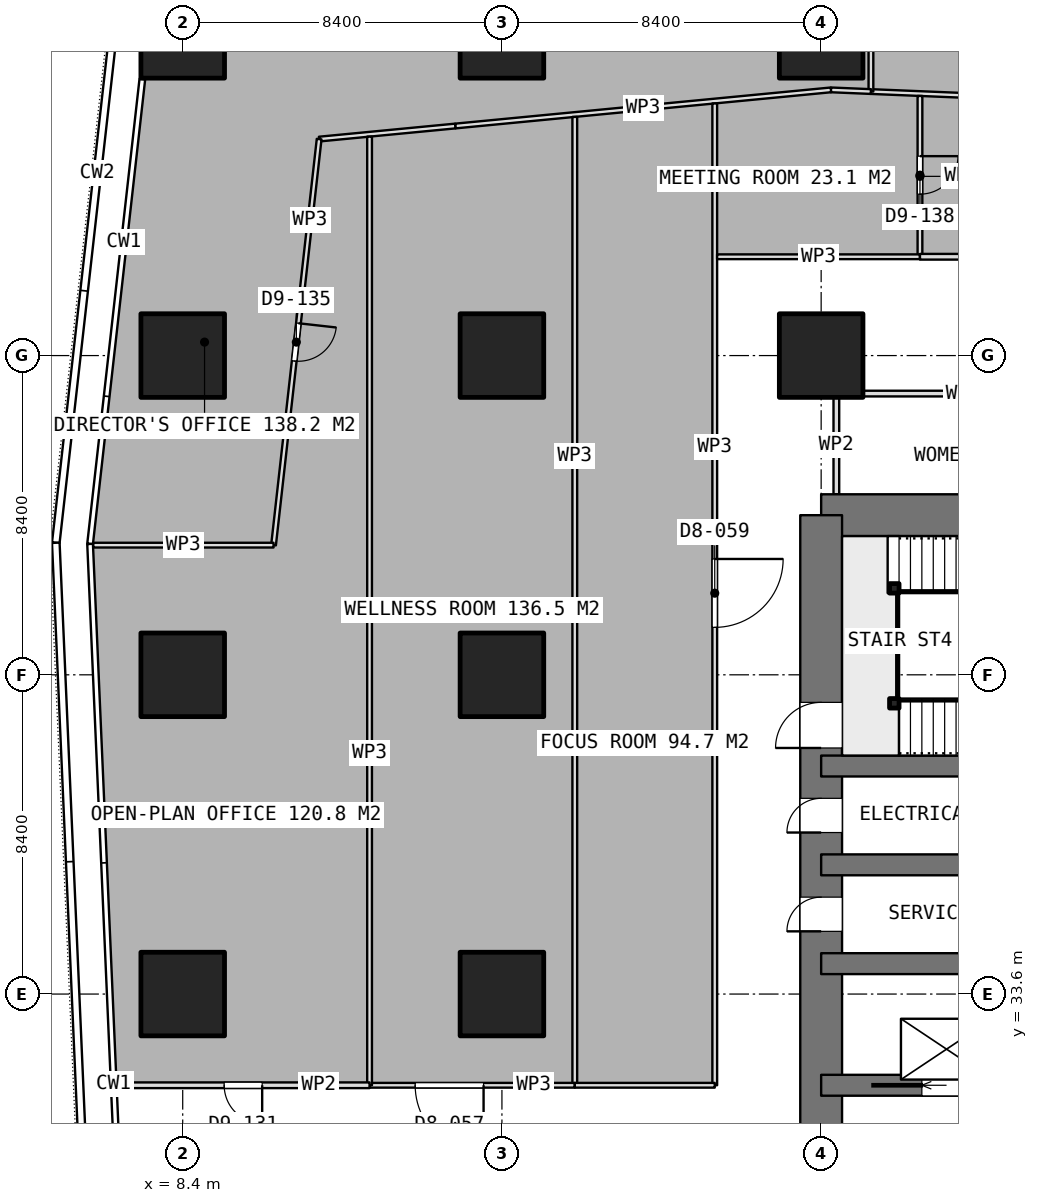
"""IFC4 building model, lengths in metres.
Left out: names, types, materials, properties, quantities, classifications, styles, units other than length and angle.
Written with IfcOpenShell. Run it as: python <this file> out.ifc"""

import sys

from ifc_helpers import new_model, si_unit, direction, frame, frame_2d, origin, origin_2d, place, context, subcontext, project, spatial, rectangle, extrude, element, fill, save


model = new_model("IFC4")
c1 = context("Model", 3, precision=1e-05, world=origin(), true_north=direction((0.0, 1.0)))
c2 = subcontext(c1, "Body", "Model", "MODEL_VIEW")
j1 = project(units=[si_unit("LENGTHUNIT", "METRE"), si_unit("PLANEANGLEUNIT", "RADIAN")], contexts=[c1])
p1 = place(None, origin())
s1 = spatial("IfcSite", under=j1, at=p1, CompositionType="ELEMENT")
p2 = place(p1, origin())
s2 = spatial("IfcBuilding", under=s1, at=p2, CompositionType="ELEMENT")
p3 = place(p2, frame((0.0, 0.0, 47.9)))
s3 = spatial("IfcBuildingStorey", under=s2, at=p3, CompositionType="ELEMENT", Elevation=47.9)
p4 = place(p3, frame((25.2, 46.2, 0.0), z_axis=(0.0, 0.0, 1.0), x_axis=(1.0, 0.0, 0.0)))
e1 = element("IfcWall", 1, at=p4, inside=s3, PredefinedType="SHEAR", context=c2, shape_type="SweptSolid", body=[
    extrude(rectangle(XDim=10.4, YDim=1.1, at=frame_2d((5.2, 0.0))), origin(), (0.0, 0.0, 1.0), 3.75),
])
p5 = place(p3, frame((25.2, 21.0, 0.0), z_axis=(0.0, 0.0, 1.0), x_axis=(0.0, 1.0, 0.0)))
e2 = element("IfcWall", 2, at=p5, inside=s3, PredefinedType="SHEAR", context=c2, shape_type="SweptSolid", body=[
    extrude(rectangle(XDim=25.2, YDim=1.1, at=frame_2d((12.6, 0.0))), origin(), (0.0, 0.0, 1.0), 3.75),
])
p6 = place(p5, frame((7.8, 0.0, 0.0)))
e3 = element("IfcOpeningElement", 3, at=p6, cuts=e2, PredefinedType="OPENING", context=c2, shape_type="SweptSolid", body=[
    extrude(rectangle(XDim=1.2, YDim=2.1, at=frame_2d((0.6, 1.05))), frame((0.0, 0.56, 0.0), z_axis=(0.0, -1.0, 0.0), x_axis=(1.0, 0.0, 0.0)), (0.0, 0.0, 1.0), 1.12),
])
p7 = place(p5, frame((14.25, 0.0, 0.0)))
e4 = element("IfcOpeningElement", 4, at=p7, cuts=e2, PredefinedType="OPENING", context=c2, shape_type="SweptSolid", body=[
    extrude(rectangle(XDim=0.9, YDim=2.1, at=frame_2d((0.45, 1.05))), frame((0.0, 0.56, 0.0), z_axis=(0.0, -1.0, 0.0), x_axis=(1.0, 0.0, 0.0)), (0.0, 0.0, 1.0), 1.12),
])
p8 = place(p5, frame((16.85, 0.0, 0.0)))
e5 = element("IfcOpeningElement", 5, at=p8, cuts=e2, PredefinedType="OPENING", context=c2, shape_type="SweptSolid", body=[
    extrude(rectangle(XDim=0.9, YDim=2.1, at=frame_2d((0.45, 1.05))), frame((0.0, 0.56, 0.0), z_axis=(0.0, -1.0, 0.0), x_axis=(1.0, 0.0, 0.0)), (0.0, 0.0, 1.0), 1.12),
])
p9 = place(p5, frame((19.075, 0.0, 0.0)))
e6 = element("IfcOpeningElement", 6, at=p9, cuts=e2, PredefinedType="OPENING", context=c2, shape_type="SweptSolid", body=[
    extrude(rectangle(XDim=1.2, YDim=2.1, at=frame_2d((0.6, 1.05))), frame((0.0, 0.56, 0.0), z_axis=(0.0, -1.0, 0.0), x_axis=(1.0, 0.0, 0.0)), (0.0, 0.0, 1.0), 1.12),
])
p10 = place(p3, frame((25.2, 31.2, 0.0), z_axis=(0.0, 0.0, 1.0), x_axis=(1.0, 0.0, 0.0)))
e7 = element("IfcWall", 7, at=p10, inside=s3, PredefinedType="SHEAR", context=c2, shape_type="SweptSolid", body=[
    extrude(rectangle(XDim=6.6, YDim=0.55, at=frame_2d((3.3, 0.0))), origin(), (0.0, 0.0, 1.0), 3.75),
])
p11 = place(p10, frame((2.65, 0.0, 0.0)))
e8 = element("IfcOpeningElement", 8, at=p11, cuts=e7, PredefinedType="OPENING", context=c2, shape_type="SweptSolid", body=[
    extrude(rectangle(XDim=1.3, YDim=2.1, at=frame_2d((0.65, 1.05))), frame((0.0, 0.285, 0.0), z_axis=(0.0, -1.0, 0.0), x_axis=(1.0, 0.0, 0.0)), (0.0, 0.0, 1.0), 0.57),
])
for number, where, z_axis, x_axis in (
    (9, (25.2, 34.4, 0.0), (0.0, 0.0, 1.0), (1.0, 0.0, 0.0)),
    (10, (25.2, 37.0, 0.0), (0.0, 0.0, 1.0), (1.0, 0.0, 0.0)),
    (11, (25.2, 39.6, 0.0), (0.0, 0.0, 1.0), (1.0, 0.0, 0.0)),
):
    element("IfcWall", number, at=place(p3, frame(where, z_axis=z_axis, x_axis=x_axis)), inside=s3, PredefinedType="SHEAR", context=c2, shape_type="SweptSolid", body=[
        extrude(rectangle(XDim=6.6, YDim=0.55, at=frame_2d((3.3, 0.0))), origin(), (0.0, 0.0, 1.0), 3.75),
    ])
for number, where, z_axis, x_axis in (
    (12, (8.4, 33.6, 0.0), (0.0, 0.0, 1.0), (1.0, 0.0, 0.0)),
    (13, (8.4, 42.0, 0.0), (0.0, 0.0, 1.0), (1.0, 0.0, 0.0)),
    (14, (8.4, 50.4, 0.0), (0.0, 0.0, 1.0), (1.0, 0.0, 0.0)),
    (15, (8.4, 58.8, 0.0), (0.0, 0.0, 1.0), (1.0, 0.0, 0.0)),
    (16, (16.8, 33.6, 0.0), (0.0, 0.0, 1.0), (1.0, 0.0, 0.0)),
    (17, (16.8, 42.0, 0.0), (0.0, 0.0, 1.0), (1.0, 0.0, 0.0)),
    (18, (16.8, 50.4, 0.0), (0.0, 0.0, 1.0), (1.0, 0.0, 0.0)),
    (19, (16.8, 58.8, 0.0), (0.0, 0.0, 1.0), (1.0, 0.0, 0.0)),
    (20, (25.2, 50.4, 0.0), (0.0, 0.0, 1.0), (1.0, 0.0, 0.0)),
    (21, (25.2, 58.8, 0.0), (0.0, 0.0, 1.0), (1.0, 0.0, 0.0)),
):
    element("IfcColumn", number, at=place(p3, frame(where, z_axis=z_axis, x_axis=x_axis)), inside=s3, PredefinedType="COLUMN", context=c2, shape_type="SweptSolid", body=[
        extrude(rectangle(XDim=2.2, YDim=2.2, at=origin_2d()), origin(), (0.0, 0.0, 1.0), 3.75),
    ])
p12 = place(p3, frame((25.525, 49.4, 0.0), z_axis=(0.0, 0.0, 1.0), x_axis=(1.0, 0.0, 0.0)))
e22 = element("IfcWall", 22, at=p12, inside=s3, PredefinedType="PARTITIONING", context=c2, shape_type="SweptSolid", body=[
    extrude(rectangle(XDim=9.75, YDim=0.15, at=frame_2d((4.875, 0.0))), origin(), (0.0, 0.0, 1.0), 3.5),
])
p13 = place(p12, frame((4.375, 0.0, 0.0)))
e23 = element("IfcOpeningElement", 23, at=p13, cuts=e22, PredefinedType="OPENING", context=c2, shape_type="SweptSolid", body=[
    extrude(rectangle(XDim=1.0, YDim=2.1, at=frame_2d((0.5, 1.05))), frame((0.0, 0.085, 0.0), z_axis=(0.0, -1.0, 0.0), x_axis=(1.0, 0.0, 0.0)), (0.0, 0.0, 1.0), 0.17),
])
p14 = place(p3, frame((25.6, 46.75, 0.0), z_axis=(0.0, 0.0, 1.0), x_axis=(0.0, 1.0, 0.0)))
e24 = element("IfcWall", 24, at=p14, inside=s3, PredefinedType="PARTITIONING", context=c2, shape_type="SweptSolid", body=[
    extrude(rectangle(XDim=2.575, YDim=0.15, at=frame_2d((1.288, 0.0))), origin(), (0.0, 0.0, 1.0), 3.5),
])
p15 = place(p3, frame((34.021, 57.037, 0.0), z_axis=(0.0, 0.0, 1.0), x_axis=(-0.999150378183, 0.041213126277, 0.0)))
e25 = element("IfcWall", 25, at=p15, inside=s3, PredefinedType="PARTITIONING", context=c2, shape_type="SweptSolid", body=[
    extrude(rectangle(XDim=7.517, YDim=0.125, at=frame_2d((3.759, 0.0))), origin(), (0.0, 0.0, 1.0), 3.5),
])
p16 = place(p15, frame((3.259, 0.0, 0.0)))
e26 = element("IfcOpeningElement", 26, at=p16, cuts=e25, PredefinedType="OPENING", context=c2, shape_type="SweptSolid", body=[
    extrude(rectangle(XDim=1.0, YDim=2.1, at=frame_2d((0.5, 1.05))), frame((0.0, 0.073, 0.0), z_axis=(0.0, -1.0, 0.0), x_axis=(1.0, 0.0, 0.0)), (0.0, 0.0, 1.0), 0.145),
])
p17 = place(p3, frame((26.51, 57.347, 0.0), z_axis=(0.0, 0.0, 1.0), x_axis=(0.0, 1.0, 0.0)))
e27 = element("IfcWall", 27, at=p17, inside=s3, PredefinedType="PARTITIONING", context=c2, shape_type="SweptSolid", body=[
    extrude(rectangle(XDim=4.724, YDim=0.125, at=frame_2d((2.362, 0.0))), origin(), (0.0, 0.0, 1.0), 3.5),
])
p18 = place(p3, frame((26.509, 57.347, 0.0), z_axis=(0.0, 0.0, 1.0), x_axis=(-0.999118951292, 0.041968097049, 0.0)))
e28 = element("IfcWall", 28, at=p18, inside=s3, PredefinedType="PARTITIONING", context=c2, shape_type="SweptSolid", body=[
    extrude(rectangle(XDim=1.053, YDim=0.125, at=frame_2d((0.526, 0.0))), origin(), (0.0, 0.0, 1.0), 3.5),
])
p19 = place(p3, frame((25.457, 57.391, 0.0), z_axis=(0.0, 0.0, 1.0), x_axis=(-0.995401503094, -0.095790644833, 0.0)))
e29 = element("IfcWall", 29, at=p19, inside=s3, PredefinedType="PARTITIONING", context=c2, shape_type="SweptSolid", body=[
    extrude(rectangle(XDim=9.93, YDim=0.125, at=frame_2d((4.965, 0.0))), origin(), (0.0, 0.0, 1.0), 3.5),
])
p20 = place(p3, frame((15.572, 56.44, 0.0), z_axis=(0.0, 0.0, 1.0), x_axis=(-0.995420457926, -0.095593472275, 0.0)))
e30 = element("IfcWall", 30, at=p20, inside=s3, PredefinedType="PARTITIONING", context=c2, shape_type="SweptSolid", body=[
    extrude(rectangle(XDim=3.599, YDim=0.125, at=frame_2d((1.799, 0.0))), origin(), (0.0, 0.0, 1.0), 3.5),
])
p21 = place(p3, frame((11.99, 56.096, 0.0), z_axis=(0.0, 0.0, 1.0), x_axis=(-0.111612849984, -0.993751765643, 0.0)))
e31 = element("IfcWall", 31, at=p21, inside=s3, PredefinedType="PARTITIONING", context=c2, shape_type="SweptSolid", body=[
    extrude(rectangle(XDim=10.751, YDim=0.125, at=frame_2d((5.375, 0.0))), origin(), (0.0, 0.0, 1.0), 3.5),
])
p22 = place(p21, frame((4.876, 0.0, 0.0)))
e32 = element("IfcOpeningElement", 32, at=p22, cuts=e31, PredefinedType="OPENING", context=c2, shape_type="SweptSolid", body=[
    extrude(rectangle(XDim=1.0, YDim=2.1, at=frame_2d((0.5, 1.05))), frame((0.0, 0.073, 0.0), z_axis=(0.0, -1.0, 0.0), x_axis=(1.0, 0.0, 0.0)), (0.0, 0.0, 1.0), 0.145),
])
p23 = place(p3, frame((10.79, 45.412, 0.0), z_axis=(0.0, 0.0, 1.0), x_axis=(-1.0, 0.0, 0.0)))
e33 = element("IfcWall", 33, at=p23, inside=s3, PredefinedType="PARTITIONING", context=c2, shape_type="SweptSolid", body=[
    extrude(rectangle(XDim=4.746, YDim=0.125, at=frame_2d((2.373, 0.0))), origin(), (0.0, 0.0, 1.0), 3.5),
])
p24 = place(p3, frame((18.717, 56.68, 0.0), z_axis=(0.0, 0.0, 1.0), x_axis=(0.0, -1.0, 0.0)))
e34 = element("IfcWall", 34, at=p24, inside=s3, PredefinedType="PARTITIONING", context=c2, shape_type="SweptSolid", body=[
    extrude(rectangle(XDim=25.48, YDim=0.125, at=frame_2d((12.74, 0.0))), origin(), (0.0, 0.0, 1.0), 3.5),
])
p25 = place(p3, frame((18.717, 31.2, 0.0), z_axis=(0.0, 0.0, 1.0), x_axis=(-1.0, 0.0, 0.0)))
e35 = element("IfcWall", 35, at=p25, inside=s3, PredefinedType="PARTITIONING", context=c2, shape_type="SweptSolid", body=[
    extrude(rectangle(XDim=5.4, YDim=0.125, at=frame_2d((2.7, 0.0))), origin(), (0.0, 0.0, 1.0), 3.5),
])
p26 = place(p25, frame((2.4, 0.0, 0.0)))
e36 = element("IfcOpeningElement", 36, at=p26, cuts=e35, PredefinedType="OPENING", context=c2, shape_type="SweptSolid", body=[
    extrude(rectangle(XDim=1.8, YDim=2.1, at=frame_2d((0.9, 1.05))), frame((0.0, 0.073, 0.0), z_axis=(0.0, -1.0, 0.0), x_axis=(1.0, 0.0, 0.0)), (0.0, 0.0, 1.0), 0.145),
])
p27 = place(p3, frame((13.317, 31.2, 0.0), z_axis=(0.0, 0.0, 1.0), x_axis=(0.0, 1.0, 0.0)))
e37 = element("IfcWall", 37, at=p27, inside=s3, PredefinedType="PARTITIONING", context=c2, shape_type="SweptSolid", body=[
    extrude(rectangle(XDim=24.961, YDim=0.125, at=frame_2d((12.48, 0.0))), origin(), (0.0, 0.0, 1.0), 3.5),
])
p28 = place(p3, frame((22.4, 57.034, 0.0), z_axis=(0.0, 0.0, 1.0), x_axis=(0.0, -1.0, 0.0)))
e38 = element("IfcWall", 38, at=p28, inside=s3, PredefinedType="PARTITIONING", context=c2, shape_type="SweptSolid", body=[
    extrude(rectangle(XDim=25.834, YDim=0.125, at=frame_2d((12.917, 0.0))), origin(), (0.0, 0.0, 1.0), 3.5),
])
p29 = place(p28, frame((11.986, 0.0, 0.0)))
e39 = element("IfcOpeningElement", 39, at=p29, cuts=e38, PredefinedType="OPENING", context=c2, shape_type="SweptSolid", body=[
    extrude(rectangle(XDim=1.8, YDim=2.1, at=frame_2d((0.9, 1.05))), frame((0.0, 0.073, 0.0), z_axis=(0.0, -1.0, 0.0), x_axis=(1.0, 0.0, 0.0)), (0.0, 0.0, 1.0), 0.145),
])
p30 = place(p3, frame((22.4, 31.2, 0.0), z_axis=(0.0, 0.0, 1.0), x_axis=(-1.0, 0.0, 0.0)))
e40 = element("IfcWall", 40, at=p30, inside=s3, PredefinedType="PARTITIONING", context=c2, shape_type="SweptSolid", body=[
    extrude(rectangle(XDim=3.683, YDim=0.125, at=frame_2d((1.841, 0.0))), origin(), (0.0, 0.0, 1.0), 3.5),
])
p31 = place(p3, frame((27.8, 57.231, 0.0), z_axis=(0.0, 0.0, 1.0), x_axis=(0.0, -1.0, 0.0)))
e41 = element("IfcWall", 41, at=p31, inside=s3, PredefinedType="PARTITIONING", context=c2, shape_type="SweptSolid", body=[
    extrude(rectangle(XDim=4.231, YDim=0.125, at=frame_2d((2.115, 0.0))), origin(), (0.0, 0.0, 1.0), 3.5),
])
p32 = place(p31, frame((1.584, 0.0, 0.0)))
e42 = element("IfcOpeningElement", 42, at=p32, cuts=e41, PredefinedType="OPENING", context=c2, shape_type="SweptSolid", body=[
    extrude(rectangle(XDim=1.0, YDim=2.1, at=frame_2d((0.5, 1.05))), frame((0.0, 0.073, 0.0), z_axis=(0.0, -1.0, 0.0), x_axis=(1.0, 0.0, 0.0)), (0.0, 0.0, 1.0), 0.145),
])
p33 = place(p3, frame((27.8, 53.0, 0.0), z_axis=(0.0, 0.0, 1.0), x_axis=(-1.0, 0.0, 0.0)))
e43 = element("IfcWall", 43, at=p33, inside=s3, PredefinedType="PARTITIONING", context=c2, shape_type="SweptSolid", body=[
    extrude(rectangle(XDim=5.338, YDim=0.125, at=frame_2d((2.669, 0.0))), origin(), (0.0, 0.0, 1.0), 3.5),
])
p34 = place(p3, frame((36.3, 53.0, 0.0), z_axis=(0.0, 0.0, 1.0), x_axis=(-1.0, 0.0, 0.0)))
e44 = element("IfcWall", 44, at=p34, inside=s3, PredefinedType="PARTITIONING", context=c2, shape_type="SweptSolid", body=[
    extrude(rectangle(XDim=8.5, YDim=0.15, at=frame_2d((4.25, 0.0))), origin(), (0.0, 0.0, 1.0), 3.5),
])
p35 = place(p34, frame((3.75, 0.0, 0.0)))
e45 = element("IfcOpeningElement", 45, at=p35, cuts=e44, PredefinedType="OPENING", context=c2, shape_type="SweptSolid", body=[
    extrude(rectangle(XDim=1.0, YDim=2.1, at=frame_2d((0.5, 1.05))), frame((0.0, 0.085, 0.0), z_axis=(0.0, -1.0, 0.0), x_axis=(1.0, 0.0, 0.0)), (0.0, 0.0, 1.0), 0.17),
])
p36 = place(p3, frame((13.317, 31.2, 0.0), z_axis=(0.0, 0.0, 1.0), x_axis=(-1.0, 0.0, 0.0)))
e46 = element("IfcWall", 46, at=p36, inside=s3, PredefinedType="PARTITIONING", context=c2, shape_type="SweptSolid", body=[
    extrude(rectangle(XDim=6.682, YDim=0.15, at=frame_2d((3.341, 0.0))), origin(), (0.0, 0.0, 1.0), 3.5),
])
p37 = place(p36, frame((2.826, 0.0, 0.0)))
e47 = element("IfcOpeningElement", 47, at=p37, cuts=e46, PredefinedType="OPENING", context=c2, shape_type="SweptSolid", body=[
    extrude(rectangle(XDim=1.0, YDim=2.1, at=frame_2d((0.5, 1.05))), frame((0.0, 0.085, 0.0), z_axis=(0.0, -1.0, 0.0), x_axis=(1.0, 0.0, 0.0)), (0.0, 0.0, 1.0), 0.17),
])
for number, where, z_axis, x_axis in (
    (48, (27.125, 41.25, 0.0), (0.0, 0.0, 1.0), (1.0, 0.0, 0.0)),
    (49, (27.125, 44.275, 0.0), (0.0, 0.0, 1.0), (1.0, 0.0, 0.0)),
):
    element("IfcColumn", number, at=place(p3, frame(where, z_axis=z_axis, x_axis=x_axis)), inside=s3, PredefinedType="COLUMN", context=c2, shape_type="SweptSolid", body=[
        extrude(rectangle(XDim=0.25, YDim=0.25, at=origin_2d()), origin(), (0.0, 0.0, 1.0), 3.75),
    ])
p38 = place(p7, origin())
e50 = element("IfcDoor", 50, at=p38, inside=s3, OperationType="SINGLE_SWING_LEFT", PredefinedType="DOOR", context=c2, shape_type="SweptSolid", body=[
    extrude(rectangle(XDim=0.9, YDim=2.1, at=frame_2d((0.45, 1.05))), frame((0.0, 0.025, 0.0), z_axis=(0.0, -1.0, 0.0), x_axis=(1.0, 0.0, 0.0)), (0.0, 0.0, 1.0), 0.05),
])
fill(e4, e50)
p39 = place(p8, origin())
e51 = element("IfcDoor", 51, at=p39, inside=s3, OperationType="SINGLE_SWING_LEFT", PredefinedType="DOOR", context=c2, shape_type="SweptSolid", body=[
    extrude(rectangle(XDim=0.9, YDim=2.1, at=frame_2d((0.45, 1.05))), frame((0.0, 0.025, 0.0), z_axis=(0.0, -1.0, 0.0), x_axis=(1.0, 0.0, 0.0)), (0.0, 0.0, 1.0), 0.05),
])
fill(e5, e51)
p40 = place(p11, origin())
e52 = element("IfcDoor", 52, at=p40, inside=s3, OperationType="SLIDING_TO_LEFT", PredefinedType="USERDEFINED", context=c2, shape_type="SweptSolid", body=[
    extrude(rectangle(XDim=1.3, YDim=2.1, at=frame_2d((0.65, 1.05))), frame((0.0, 0.025, 0.0), z_axis=(0.0, -1.0, 0.0), x_axis=(1.0, 0.0, 0.0)), (0.0, 0.0, 1.0), 0.05),
])
fill(e8, e52)
p41 = place(p22, origin())
e53 = element("IfcDoor", 53, at=p41, inside=s3, OperationType="SINGLE_SWING_LEFT", PredefinedType="DOOR", context=c2, shape_type="SweptSolid", body=[
    extrude(rectangle(XDim=1.0, YDim=2.1, at=frame_2d((0.5, 1.05))), frame((0.0, 0.025, 0.0), z_axis=(0.0, -1.0, 0.0), x_axis=(1.0, 0.0, 0.0)), (0.0, 0.0, 1.0), 0.05),
])
fill(e32, e53)
p42 = place(p26, origin())
e54 = element("IfcDoor", 54, at=p42, inside=s3, OperationType="DOUBLE_DOOR_SINGLE_SWING", PredefinedType="DOOR", context=c2, shape_type="SweptSolid", body=[
    extrude(rectangle(XDim=1.8, YDim=2.1, at=frame_2d((0.9, 1.05))), frame((0.0, 0.025, 0.0), z_axis=(0.0, -1.0, 0.0), x_axis=(1.0, 0.0, 0.0)), (0.0, 0.0, 1.0), 0.05),
])
fill(e36, e54)
p43 = place(p29, origin())
e55 = element("IfcDoor", 55, at=p43, inside=s3, OperationType="DOUBLE_DOOR_SINGLE_SWING", PredefinedType="DOOR", context=c2, shape_type="SweptSolid", body=[
    extrude(rectangle(XDim=1.8, YDim=2.1, at=frame_2d((0.9, 1.05))), frame((0.0, 0.025, 0.0), z_axis=(0.0, -1.0, 0.0), x_axis=(1.0, 0.0, 0.0)), (0.0, 0.0, 1.0), 0.05),
])
fill(e39, e55)
p44 = place(p32, origin())
e56 = element("IfcDoor", 56, at=p44, inside=s3, OperationType="SINGLE_SWING_LEFT", PredefinedType="DOOR", context=c2, shape_type="SweptSolid", body=[
    extrude(rectangle(XDim=1.0, YDim=2.1, at=frame_2d((0.5, 1.05))), frame((0.0, 0.025, 0.0), z_axis=(0.0, -1.0, 0.0), x_axis=(1.0, 0.0, 0.0)), (0.0, 0.0, 1.0), 0.05),
])
fill(e42, e56)
p45 = place(p37, origin())
e57 = element("IfcDoor", 57, at=p45, inside=s3, OperationType="SINGLE_SWING_LEFT", PredefinedType="DOOR", context=c2, shape_type="SweptSolid", body=[
    extrude(rectangle(XDim=1.0, YDim=2.1, at=frame_2d((0.5, 1.05))), frame((0.0, 0.025, 0.0), z_axis=(0.0, -1.0, 0.0), x_axis=(1.0, 0.0, 0.0)), (0.0, 0.0, 1.0), 0.05),
])
fill(e47, e57)
p46 = place(p9, origin())
e58 = element("IfcDoor", 58, at=p46, inside=s3, OperationType="SINGLE_SWING_RIGHT", PredefinedType="DOOR", context=c2, shape_type="SweptSolid", body=[
    extrude(rectangle(XDim=1.2, YDim=2.1, at=frame_2d((0.6, 1.05))), frame((0.0, 0.025, 0.0), z_axis=(0.0, -1.0, 0.0), x_axis=(1.0, 0.0, 0.0)), (0.0, 0.0, 1.0), 0.05),
])
fill(e6, e58)
save(model, sys.argv[1])
